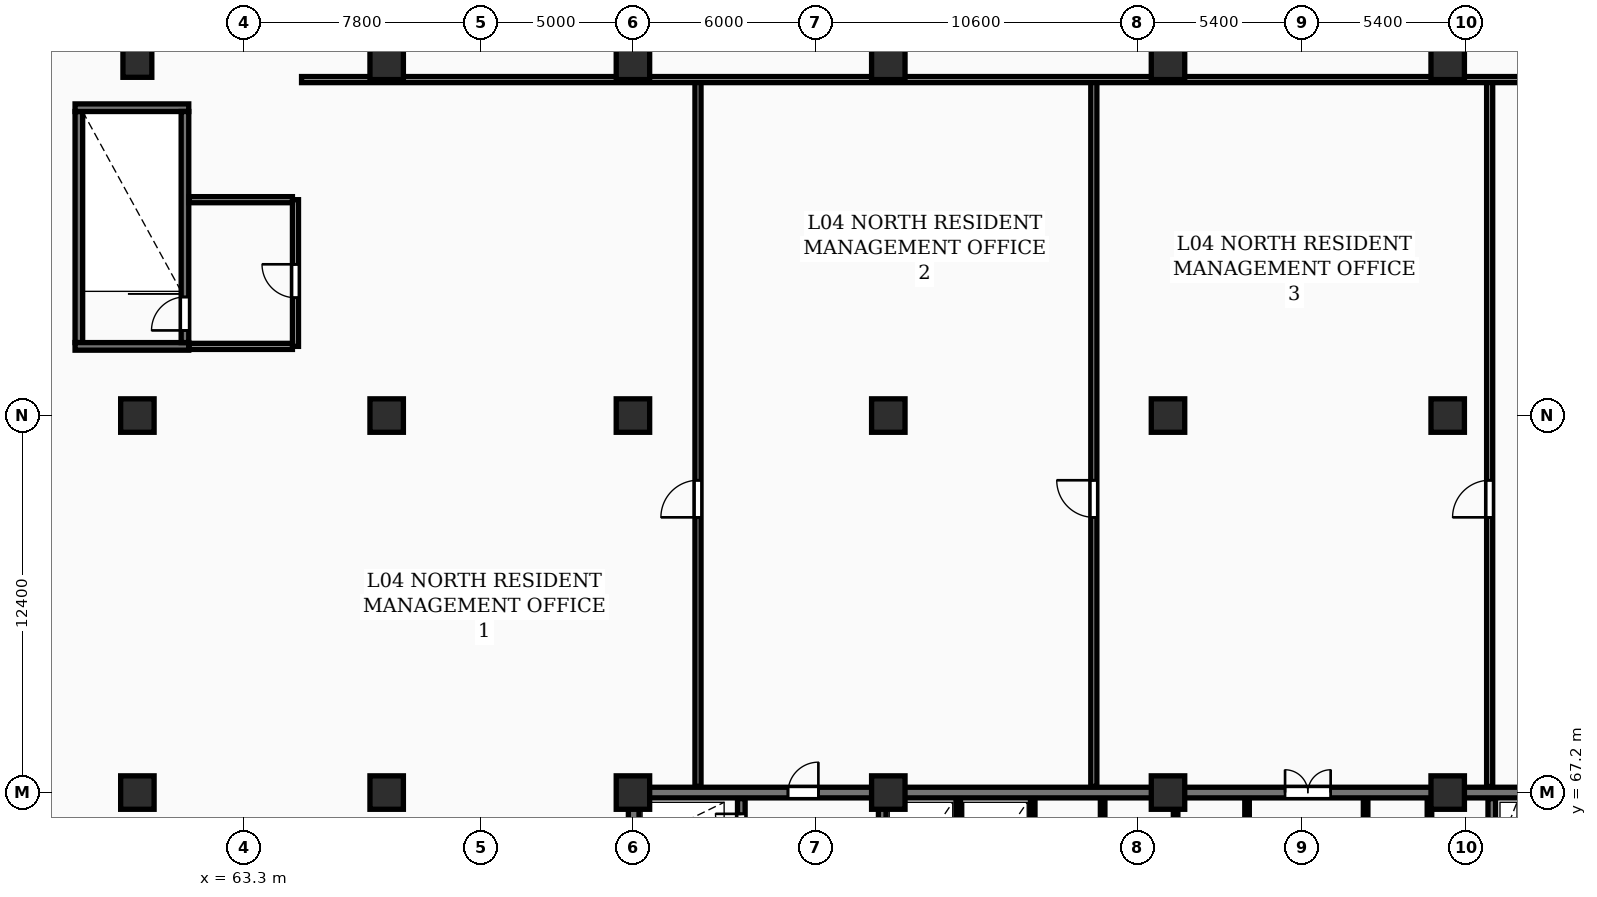
"""IFC4 building model, lengths in metres.
Left out: names, types, materials, properties, quantities, classifications, styles, units other than length and angle.
Written with IfcOpenShell. Run it as: python <this file> out.ifc"""

import sys

from ifc_helpers import new_model, si_unit, direction, frame, frame_2d, origin, origin_2d, place, context, subcontext, project, spatial, rectangle, circle, extrude, element, fill, save


model = new_model("IFC4")
c1 = context("Model", 3, precision=1e-05, world=origin(), true_north=direction((0.0, 1.0)))
c2 = subcontext(c1, "Body", "Model", "MODEL_VIEW")
j1 = project(units=[si_unit("LENGTHUNIT", "METRE"), si_unit("PLANEANGLEUNIT", "RADIAN")], contexts=[c1])
p1 = place(None, origin())
s1 = spatial("IfcSite", under=j1, at=p1, CompositionType="ELEMENT")
p2 = place(p1, origin())
s2 = spatial("IfcBuilding", under=s1, at=p2, CompositionType="ELEMENT")
p3 = place(p2, frame((0.0, 0.0, 19.0)))
s3 = spatial("IfcBuildingStorey", under=s2, at=p3, CompositionType="ELEMENT", Elevation=19.0)
for number, where, z_axis, x_axis in (
    (1, (59.8, 67.2, 0.0), (0.0, 0.0, 1.0), (1.0, 0.0, 0.0)),
    (2, (59.8, 79.6, 0.0), (0.0, 0.0, 1.0), (1.0, 0.0, 0.0)),
):
    element("IfcColumn", number, at=place(p3, frame(where, z_axis=z_axis, x_axis=x_axis)), inside=s3, PredefinedType="COLUMN", context=c2, shape_type="SweptSolid", body=[
        extrude(rectangle(XDim=1.1, YDim=1.1, at=origin_2d()), origin(), (0.0, 0.0, 1.0), 5.0),
    ])
p4 = place(p3, frame((59.8, 91.2, 0.0), z_axis=(0.0, 0.0, 1.0), x_axis=(1.0, 0.0, 0.0)))
e3 = element("IfcColumn", 3, at=p4, inside=s3, PredefinedType="COLUMN", context=c2, shape_type="SweptSolid", body=[
    extrude(circle(Radius=0.475, at=origin_2d()), origin(), (0.0, 0.0, 1.0), 5.0),
])
for number, where, z_axis, x_axis in (
    (4, (68.0, 67.2, 0.0), (0.0, 0.0, 1.0), (1.0, 0.0, 0.0)),
    (5, (68.0, 79.6, 0.0), (0.0, 0.0, 1.0), (1.0, 0.0, 0.0)),
    (6, (68.0, 91.2, 0.0), (0.0, 0.0, 1.0), (1.0, 0.0, 0.0)),
    (7, (76.1, 67.2, 0.0), (0.0, 0.0, 1.0), (1.0, 0.0, 0.0)),
    (8, (76.1, 79.6, 0.0), (0.0, 0.0, 1.0), (1.0, 0.0, 0.0)),
    (9, (76.1, 91.2, 0.0), (0.0, 0.0, 1.0), (1.0, 0.0, 0.0)),
    (10, (84.5, 67.2, 0.0), (0.0, 0.0, 1.0), (1.0, 0.0, 0.0)),
    (11, (84.5, 79.6, 0.0), (0.0, 0.0, 1.0), (1.0, 0.0, 0.0)),
    (12, (84.5, 91.2, 0.0), (0.0, 0.0, 1.0), (1.0, 0.0, 0.0)),
    (13, (93.7, 67.2, 0.0), (0.0, 0.0, 1.0), (1.0, 0.0, 0.0)),
    (14, (93.7, 79.6, 0.0), (0.0, 0.0, 1.0), (1.0, 0.0, 0.0)),
    (15, (93.7, 91.2, 0.0), (0.0, 0.0, 1.0), (1.0, 0.0, 0.0)),
    (16, (102.9, 67.2, 0.0), (0.0, 0.0, 1.0), (1.0, 0.0, 0.0)),
    (17, (102.9, 79.6, 0.0), (0.0, 0.0, 1.0), (1.0, 0.0, 0.0)),
    (18, (102.9, 91.2, 0.0), (0.0, 0.0, 1.0), (1.0, 0.0, 0.0)),
):
    element("IfcColumn", number, at=place(p3, frame(where, z_axis=z_axis, x_axis=x_axis)), inside=s3, PredefinedType="COLUMN", context=c2, shape_type="SweptSolid", body=[
        extrude(rectangle(XDim=1.1, YDim=1.1, at=origin_2d()), origin(), (0.0, 0.0, 1.0), 5.0),
    ])
p5 = place(p3, frame((76.125, 55.375, 0.0), z_axis=(0.0, 0.0, 1.0), x_axis=(0.0, 1.0, 0.0)))
e19 = element("IfcWall", 19, at=p5, inside=s3, PredefinedType="SHEAR", context=c2, shape_type="SweptSolid", body=[
    extrude(rectangle(XDim=11.65, YDim=0.35, at=frame_2d((5.825, 0.0))), origin(), (0.0, 0.0, 1.0), 5.0),
])
p6 = place(p3, frame((75.95, 67.2, 0.0), z_axis=(0.0, 0.0, 1.0), x_axis=(1.0, 0.0, 0.0)))
e20 = element("IfcWall", 20, at=p6, inside=s3, PredefinedType="SHEAR", context=c2, shape_type="SweptSolid", body=[
    extrude(rectangle(XDim=36.3, YDim=0.35, at=frame_2d((18.15, 0.0))), origin(), (0.0, 0.0, 1.0), 5.0),
])
p7 = place(p6, frame((5.25, 0.0, 0.0)))
e21 = element("IfcOpeningElement", 21, at=p7, cuts=e20, PredefinedType="OPENING", context=c2, shape_type="SweptSolid", body=[
    extrude(rectangle(XDim=1.0, YDim=2.15, at=frame_2d((0.5, 1.075))), frame((0.0, 0.185, 0.0), z_axis=(0.0, -1.0, 0.0), x_axis=(1.0, 0.0, 0.0)), (0.0, 0.0, 1.0), 0.37),
])
p8 = place(p6, frame((21.6, 0.0, 0.0)))
e22 = element("IfcOpeningElement", 22, at=p8, cuts=e20, PredefinedType="OPENING", context=c2, shape_type="SweptSolid", body=[
    extrude(rectangle(XDim=1.5, YDim=2.2, at=frame_2d((0.75, 1.1))), frame((0.0, 0.185, 0.0), z_axis=(0.0, -1.0, 0.0), x_axis=(1.0, 0.0, 0.0)), (0.0, 0.0, 1.0), 0.37),
])
p9 = place(p6, frame((30.45, 0.0, 0.0)))
e23 = element("IfcOpeningElement", 23, at=p9, cuts=e20, PredefinedType="OPENING", context=c2, shape_type="SweptSolid", body=[
    extrude(rectangle(XDim=1.0, YDim=2.15, at=frame_2d((0.5, 1.075))), frame((0.0, 0.185, 0.0), z_axis=(0.0, -1.0, 0.0), x_axis=(1.0, 0.0, 0.0)), (0.0, 0.0, 1.0), 0.37),
])
p10 = place(p3, frame((79.665, 55.4, 0.0), z_axis=(0.0, 0.0, 1.0), x_axis=(0.0, 1.0, 0.0)))
e24 = element("IfcWall", 24, at=p10, inside=s3, PredefinedType="SHEAR", context=c2, shape_type="SweptSolid", body=[
    extrude(rectangle(XDim=11.6, YDim=0.25, at=frame_2d((5.8, 0.0))), origin(), (0.0, 0.0, 1.0), 5.0),
])
p11 = place(p10, frame((0.55, 0.0, 0.0)))
e25 = element("IfcOpeningElement", 25, at=p11, cuts=e24, PredefinedType="OPENING", context=c2, shape_type="SweptSolid", body=[
    extrude(rectangle(XDim=0.85, YDim=2.05, at=frame_2d((0.425, 1.025))), frame((0.0, 0.135, 0.0), z_axis=(0.0, -1.0, 0.0), x_axis=(1.0, 0.0, 0.0)), (0.0, 0.0, 1.0), 0.27),
])
p12 = place(p10, frame((8.4, 0.0, 0.0)))
e26 = element("IfcOpeningElement", 26, at=p12, cuts=e24, PredefinedType="OPENING", context=c2, shape_type="SweptSolid", body=[
    extrude(rectangle(XDim=1.1, YDim=2.1, at=frame_2d((0.55, 1.05))), frame((0.0, 0.135, 0.0), z_axis=(0.0, -1.0, 0.0), x_axis=(1.0, 0.0, 0.0)), (0.0, 0.0, 1.0), 0.27),
])
p13 = place(p10, frame((10.25, 0.0, 0.0)))
e27 = element("IfcOpeningElement", 27, at=p13, cuts=e24, PredefinedType="OPENING", context=c2, shape_type="SweptSolid", body=[
    extrude(rectangle(XDim=0.85, YDim=2.05, at=frame_2d((0.425, 1.025))), frame((0.0, 0.135, 0.0), z_axis=(0.0, -1.0, 0.0), x_axis=(1.0, 0.0, 0.0)), (0.0, 0.0, 1.0), 0.27),
])
p14 = place(p3, frame((84.3, 55.4, 0.0), z_axis=(0.0, 0.0, 1.0), x_axis=(0.0, 1.0, 0.0)))
e28 = element("IfcWall", 28, at=p14, inside=s3, PredefinedType="SHEAR", context=c2, shape_type="SweptSolid", body=[
    extrude(rectangle(XDim=11.6, YDim=0.25, at=frame_2d((5.8, 0.0))), origin(), (0.0, 0.0, 1.0), 5.0),
])
p15 = place(p14, frame((5.2, 0.0, 0.0)))
e29 = element("IfcOpeningElement", 29, at=p15, cuts=e28, PredefinedType="OPENING", context=c2, shape_type="SweptSolid", body=[
    extrude(rectangle(XDim=1.1, YDim=2.1, at=frame_2d((0.55, 1.05))), frame((0.0, 0.135, 0.0), z_axis=(0.0, -1.0, 0.0), x_axis=(1.0, 0.0, 0.0)), (0.0, 0.0, 1.0), 0.27),
])
for number, where, z_axis, x_axis in (
    (30, (86.8, 63.4, 0.0), (0.0, 0.0, 1.0), (0.0, 1.0, 0.0)),
    (31, (89.25, 63.4, 0.0), (0.0, 0.0, 1.0), (0.0, 1.0, 0.0)),
    (32, (91.55, 63.4, 0.0), (0.0, 0.0, 1.0), (0.0, 1.0, 0.0)),
):
    element("IfcWall", number, at=place(p3, frame(where, z_axis=z_axis, x_axis=x_axis)), inside=s3, PredefinedType="PARTITIONING", context=c2, shape_type="SweptSolid", body=[
        extrude(rectangle(XDim=3.6, YDim=0.15, at=frame_2d((1.8, 0.0))), origin(), (0.0, 0.0, 1.0), 4.68),
    ])
for number, where, z_axis, x_axis in (
    (33, (93.95, 63.4, 0.0), (0.0, 0.0, 1.0), (0.0, 1.0, 0.0)),
    (34, (102.3, 63.4, 0.0), (0.0, 0.0, 1.0), (0.0, 1.0, 0.0)),
):
    element("IfcWall", number, at=place(p3, frame(where, z_axis=z_axis, x_axis=x_axis)), inside=s3, PredefinedType="PARTITIONING", context=c2, shape_type="SweptSolid", body=[
        extrude(rectangle(XDim=3.6, YDim=0.15, at=frame_2d((1.8, 0.0))), origin(), (0.0, 0.0, 1.0), 3.43),
    ])
for number, where, z_axis, x_axis in (
    (35, (96.3, 63.4, 0.0), (0.0, 0.0, 1.0), (0.0, 1.0, 0.0)),
    (36, (100.2, 63.4, 0.0), (0.0, 0.0, 1.0), (0.0, 1.0, 0.0)),
):
    element("IfcWall", number, at=place(p3, frame(where, z_axis=z_axis, x_axis=x_axis)), inside=s3, PredefinedType="PARTITIONING", context=c2, shape_type="SweptSolid", body=[
        extrude(rectangle(XDim=3.6, YDim=0.15, at=frame_2d((1.8, 0.0))), origin(), (0.0, 0.0, 1.0), 4.68),
    ])
p16 = place(p3, frame((104.35, 58.4, 0.0), z_axis=(0.0, 0.0, 1.0), x_axis=(0.0, 1.0, 0.0)))
e37 = element("IfcWall", 37, at=p16, inside=s3, PredefinedType="SHEAR", context=c2, shape_type="SweptSolid", body=[
    extrude(rectangle(XDim=8.6, YDim=0.25, at=frame_2d((4.3, 0.0))), origin(), (0.0, 0.0, 1.0), 5.0),
])
p17 = place(p16, frame((1.8, 0.0, 0.0)))
e38 = element("IfcOpeningElement", 38, at=p17, cuts=e37, PredefinedType="OPENING", context=c2, shape_type="SweptSolid", body=[
    extrude(rectangle(XDim=1.1, YDim=2.1, at=frame_2d((0.55, 1.05))), frame((0.0, 0.135, 0.0), z_axis=(0.0, -1.0, 0.0), x_axis=(1.0, 0.0, 0.0)), (0.0, 0.0, 1.0), 0.27),
])
p18 = place(p3, frame((57.875, 82.0, 0.0), z_axis=(0.0, 0.0, 1.0), x_axis=(0.0, 1.0, 0.0)))
e39 = element("IfcWall", 39, at=p18, inside=s3, PredefinedType="SHEAR", context=c2, shape_type="SweptSolid", body=[
    extrude(rectangle(XDim=7.6, YDim=0.25, at=frame_2d((3.8, 0.0))), origin(), (0.0, 0.0, 1.0), 5.0),
])
for number, where, z_axis, x_axis in (
    (40, (57.75, 81.875, 0.0), (0.0, 0.0, 1.0), (1.0, 0.0, 0.0)),
    (41, (57.75, 89.725, 0.0), (0.0, 0.0, 1.0), (1.0, 0.0, 0.0)),
):
    element("IfcWall", number, at=place(p3, frame(where, z_axis=z_axis, x_axis=x_axis)), inside=s3, PredefinedType="SHEAR", context=c2, shape_type="SweptSolid", body=[
        extrude(rectangle(XDim=3.74, YDim=0.25, at=frame_2d((1.87, 0.0))), origin(), (0.0, 0.0, 1.0), 5.0),
    ])
p19 = place(p3, frame((61.365, 82.0, 0.0), z_axis=(0.0, 0.0, 1.0), x_axis=(0.0, 1.0, 0.0)))
e42 = element("IfcWall", 42, at=p19, inside=s3, PredefinedType="SHEAR", context=c2, shape_type="SweptSolid", body=[
    extrude(rectangle(XDim=7.6, YDim=0.25, at=frame_2d((3.8, 0.0))), origin(), (0.0, 0.0, 1.0), 5.0),
])
p20 = place(p19, frame((0.4, 0.0, 0.0)))
e43 = element("IfcOpeningElement", 43, at=p20, cuts=e42, PredefinedType="OPENING", context=c2, shape_type="SweptSolid", body=[
    extrude(rectangle(XDim=1.1, YDim=2.1, at=frame_2d((0.55, 1.05))), frame((0.0, 0.135, 0.0), z_axis=(0.0, -1.0, 0.0), x_axis=(1.0, 0.0, 0.0)), (0.0, 0.0, 1.0), 0.27),
])
p21 = place(p3, frame((65.0, 81.875, 0.0), z_axis=(0.0, 0.0, 1.0), x_axis=(0.0, 1.0, 0.0)))
e44 = element("IfcWall", 44, at=p21, inside=s3, PredefinedType="PARTITIONING", context=c2, shape_type="SweptSolid", body=[
    extrude(rectangle(XDim=4.825, YDim=0.2, at=frame_2d((2.413, 0.0))), origin(), (0.0, 0.0, 1.0), 4.68),
])
p22 = place(p21, frame((1.6, 0.0, 0.0)))
e45 = element("IfcOpeningElement", 45, at=p22, cuts=e44, PredefinedType="OPENING", context=c2, shape_type="SweptSolid", body=[
    extrude(rectangle(XDim=1.1, YDim=2.15, at=frame_2d((0.55, 1.075))), frame((0.0, 0.11, 0.0), z_axis=(0.0, -1.0, 0.0), x_axis=(1.0, 0.0, 0.0)), (0.0, 0.0, 1.0), 0.22),
])
for number, where, z_axis, x_axis in (
    (46, (61.5, 81.875, 0.0), (0.0, 0.0, 1.0), (1.0, 0.0, 0.0)),
    (47, (61.5, 86.7, 0.0), (0.0, 0.0, 1.0), (1.0, 0.0, 0.0)),
):
    element("IfcWall", number, at=place(p3, frame(where, z_axis=z_axis, x_axis=x_axis)), inside=s3, PredefinedType="PARTITIONING", context=c2, shape_type="SweptSolid", body=[
        extrude(rectangle(XDim=3.4, YDim=0.2, at=frame_2d((1.7, 0.0))), origin(), (0.0, 0.0, 1.0), 4.68),
    ])
p23 = place(p3, frame((78.24, 67.4, 0.0), z_axis=(0.0, 0.0, 1.0), x_axis=(0.0, 1.0, 0.0)))
e48 = element("IfcWall", 48, at=p23, inside=s3, PredefinedType="PARTITIONING", context=c2, shape_type="SweptSolid", body=[
    extrude(rectangle(XDim=23.25, YDim=0.2, at=frame_2d((11.625, 0.0))), origin(), (0.0, 0.0, 1.0), 4.68),
])
p24 = place(p23, frame((8.852, 0.0, 0.0)))
e49 = element("IfcOpeningElement", 49, at=p24, cuts=e48, PredefinedType="OPENING", context=c2, shape_type="SweptSolid", body=[
    extrude(rectangle(XDim=1.22, YDim=2.18, at=frame_2d((0.61, 1.09))), frame((0.0, 0.11, 0.0), z_axis=(0.0, -1.0, 0.0), x_axis=(1.0, 0.0, 0.0)), (0.0, 0.0, 1.0), 0.22),
])
p25 = place(p3, frame((91.26, 67.4, 0.0), z_axis=(0.0, 0.0, 1.0), x_axis=(0.0, 1.0, 0.0)))
e50 = element("IfcWall", 50, at=p25, inside=s3, PredefinedType="PARTITIONING", context=c2, shape_type="SweptSolid", body=[
    extrude(rectangle(XDim=23.25, YDim=0.2, at=frame_2d((11.625, 0.0))), origin(), (0.0, 0.0, 1.0), 4.68),
])
p26 = place(p25, frame((8.852, 0.0, 0.0)))
e51 = element("IfcOpeningElement", 51, at=p26, cuts=e50, PredefinedType="OPENING", context=c2, shape_type="SweptSolid", body=[
    extrude(rectangle(XDim=1.22, YDim=2.18, at=frame_2d((0.61, 1.09))), frame((0.0, 0.11, 0.0), z_axis=(0.0, -1.0, 0.0), x_axis=(1.0, 0.0, 0.0)), (0.0, 0.0, 1.0), 0.22),
])
p27 = place(p3, frame((104.28, 67.4, 0.0), z_axis=(0.0, 0.0, 1.0), x_axis=(0.0, 1.0, 0.0)))
e52 = element("IfcWall", 52, at=p27, inside=s3, PredefinedType="PARTITIONING", context=c2, shape_type="SweptSolid", body=[
    extrude(rectangle(XDim=23.25, YDim=0.2, at=frame_2d((11.625, 0.0))), origin(), (0.0, 0.0, 1.0), 4.68),
])
p28 = place(p27, frame((8.852, 0.0, 0.0)))
e53 = element("IfcOpeningElement", 53, at=p28, cuts=e52, PredefinedType="OPENING", context=c2, shape_type="SweptSolid", body=[
    extrude(rectangle(XDim=1.22, YDim=2.18, at=frame_2d((0.61, 1.09))), frame((0.0, 0.11, 0.0), z_axis=(0.0, -1.0, 0.0), x_axis=(1.0, 0.0, 0.0)), (0.0, 0.0, 1.0), 0.22),
])
p29 = place(p3, frame((65.2, 90.65, 0.0), z_axis=(0.0, 0.0, 1.0), x_axis=(1.0, 0.0, 0.0)))
e54 = element("IfcWall", 54, at=p29, inside=s3, PredefinedType="PARTITIONING", context=c2, shape_type="SweptSolid", body=[
    extrude(rectangle(XDim=65.3, YDim=0.2, at=frame_2d((32.65, 0.0))), origin(), (0.0, 0.0, 1.0), 3.43),
])
p30 = place(p7, origin())
e55 = element("IfcDoor", 55, at=p30, inside=s3, OperationType="SINGLE_SWING_RIGHT", PredefinedType="DOOR", context=c2, shape_type="SweptSolid", body=[
    extrude(rectangle(XDim=1.0, YDim=2.15, at=frame_2d((0.5, 1.075))), frame((0.0, 0.025, 0.0), z_axis=(0.0, -1.0, 0.0), x_axis=(1.0, 0.0, 0.0)), (0.0, 0.0, 1.0), 0.05),
])
fill(e21, e55)
p31 = place(p8, origin())
e56 = element("IfcDoor", 56, at=p31, inside=s3, OperationType="DOUBLE_DOOR_SINGLE_SWING", PredefinedType="DOOR", context=c2, shape_type="SweptSolid", body=[
    extrude(rectangle(XDim=1.5, YDim=2.2, at=frame_2d((0.75, 1.1))), frame((0.0, 0.025, 0.0), z_axis=(0.0, -1.0, 0.0), x_axis=(1.0, 0.0, 0.0)), (0.0, 0.0, 1.0), 0.05),
])
fill(e22, e56)
p32 = place(p13, origin())
e57 = element("IfcDoor", 57, at=p32, inside=s3, OperationType="SINGLE_SWING_RIGHT", PredefinedType="DOOR", context=c2, shape_type="SweptSolid", body=[
    extrude(rectangle(XDim=0.85, YDim=2.05, at=frame_2d((0.425, 1.025))), frame((0.0, 0.025, 0.0), z_axis=(0.0, -1.0, 0.0), x_axis=(1.0, 0.0, 0.0)), (0.0, 0.0, 1.0), 0.05),
])
fill(e27, e57)
p33 = place(p20, origin())
e58 = element("IfcDoor", 58, at=p33, inside=s3, OperationType="SINGLE_SWING_LEFT", PredefinedType="DOOR", context=c2, shape_type="SweptSolid", body=[
    extrude(rectangle(XDim=1.1, YDim=2.1, at=frame_2d((0.55, 1.05))), frame((0.0, 0.025, 0.0), z_axis=(0.0, -1.0, 0.0), x_axis=(1.0, 0.0, 0.0)), (0.0, 0.0, 1.0), 0.05),
])
fill(e43, e58)
p34 = place(p22, origin())
e59 = element("IfcDoor", 59, at=p34, inside=s3, OperationType="SINGLE_SWING_RIGHT", PredefinedType="DOOR", context=c2, shape_type="SweptSolid", body=[
    extrude(rectangle(XDim=1.1, YDim=2.15, at=frame_2d((0.55, 1.075))), frame((0.0, 0.025, 0.0), z_axis=(0.0, -1.0, 0.0), x_axis=(1.0, 0.0, 0.0)), (0.0, 0.0, 1.0), 0.05),
])
fill(e45, e59)
p35 = place(p24, origin())
e60 = element("IfcDoor", 60, at=p35, inside=s3, OperationType="SINGLE_SWING_LEFT", PredefinedType="DOOR", context=c2, shape_type="SweptSolid", body=[
    extrude(rectangle(XDim=1.22, YDim=2.18, at=frame_2d((0.61, 1.09))), frame((0.0, 0.025, 0.0), z_axis=(0.0, -1.0, 0.0), x_axis=(1.0, 0.0, 0.0)), (0.0, 0.0, 1.0), 0.05),
])
fill(e49, e60)
p36 = place(p26, origin())
e61 = element("IfcDoor", 61, at=p36, inside=s3, OperationType="SINGLE_SWING_RIGHT", PredefinedType="DOOR", context=c2, shape_type="SweptSolid", body=[
    extrude(rectangle(XDim=1.22, YDim=2.18, at=frame_2d((0.61, 1.09))), frame((0.0, 0.025, 0.0), z_axis=(0.0, -1.0, 0.0), x_axis=(1.0, 0.0, 0.0)), (0.0, 0.0, 1.0), 0.05),
])
fill(e51, e61)
p37 = place(p28, origin())
e62 = element("IfcDoor", 62, at=p37, inside=s3, OperationType="SINGLE_SWING_LEFT", PredefinedType="DOOR", context=c2, shape_type="SweptSolid", body=[
    extrude(rectangle(XDim=1.22, YDim=2.18, at=frame_2d((0.61, 1.09))), frame((0.0, 0.025, 0.0), z_axis=(0.0, -1.0, 0.0), x_axis=(1.0, 0.0, 0.0)), (0.0, 0.0, 1.0), 0.05),
])
fill(e53, e62)
save(model, sys.argv[1])
